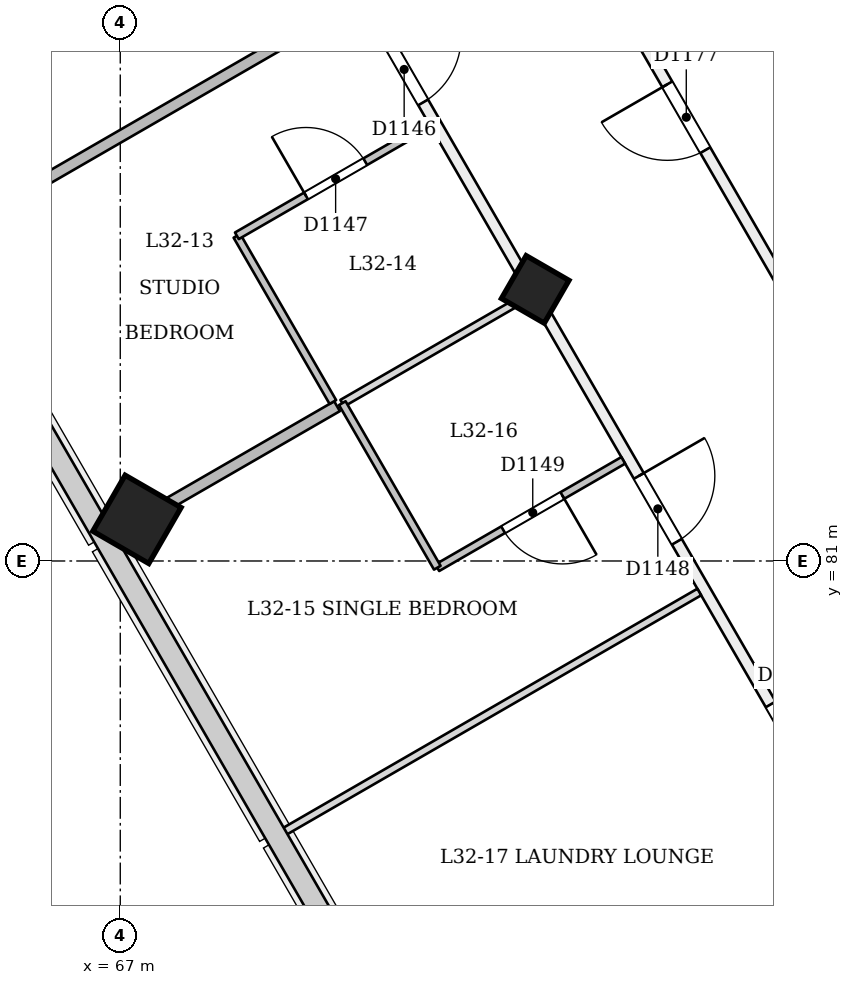
"""IFC4 building model, lengths in metres.
Left out: names, types, materials, properties, quantities, classifications, styles, units other than length and angle.
Written with IfcOpenShell. Run it as: python <this file> out.ifc"""

import sys

from ifc_helpers import new_model, si_unit, direction, frame, frame_2d, origin, origin_2d, place, context, subcontext, project, spatial, rectangle, extrude, element, fill, save


model = new_model("IFC4")
c1 = context("Model", 3, precision=1e-05, world=origin(), true_north=direction((0.0, 1.0)))
c2 = subcontext(c1, "Body", "Model", "MODEL_VIEW")
j1 = project(units=[si_unit("LENGTHUNIT", "METRE"), si_unit("PLANEANGLEUNIT", "RADIAN")], contexts=[c1])
p1 = place(None, origin())
s1 = spatial("IfcSite", under=j1, at=p1, CompositionType="ELEMENT")
p2 = place(p1, origin())
s2 = spatial("IfcBuilding", under=s1, at=p2, CompositionType="ELEMENT")
p3 = place(p2, frame((0.0, 0.0, 127.8)))
s3 = spatial("IfcBuildingStorey", under=s2, at=p3, CompositionType="ELEMENT", Elevation=127.8)
p4 = place(p3, frame((72.432, 84.526, -0.02), z_axis=(0.02222134892, 0.038480872521, 0.999012229206), x_axis=(-0.865639418776, -0.499186807044, 0.038482831667)))
e1 = element("IfcColumn", 1, at=p4, inside=s3, PredefinedType="COLUMN", context=c2, shape_type="SweptSolid", body=[
    extrude(rectangle(XDim=0.65, YDim=0.65, at=origin_2d()), origin(), (0.0, 0.0, 1.0), 3.604),
])
p5 = place(p3, frame((67.192, 81.5, -0.026), z_axis=(0.02215369191, 0.038413282303, 0.999016333038), x_axis=(-0.865362005459, -0.499673714439, 0.038402846323)))
e2 = element("IfcColumn", 2, at=p5, inside=s3, PredefinedType="COLUMN", context=c2, shape_type="SweptSolid", body=[
    extrude(rectangle(XDim=0.85, YDim=0.85, at=origin_2d()), origin(), (0.0, 0.0, 1.0), 3.604),
])
p6 = place(p3, frame((85.0, 68.559, 0.0), z_axis=(0.0, 0.0, 1.0), x_axis=(-0.499999561005, 0.866025657238, 0.0)))
e3 = element("IfcWall", 3, at=p6, inside=s3, PredefinedType="PARTITIONING", context=c2, shape_type="SweptSolid", body=[
    extrude(rectangle(XDim=24.989, YDim=0.15, at=frame_2d((12.495, 0.0))), origin(), (0.0, 0.0, 1.0), 3.15),
])
p7 = place(p6, frame((2.515, 0.0, 0.0)))
e4 = element("IfcOpeningElement", 4, at=p7, cuts=e3, PredefinedType="OPENING", context=c2, shape_type="SweptSolid", body=[
    extrude(rectangle(XDim=0.9, YDim=2.1, at=frame_2d((0.45, 1.05))), frame((0.0, 0.085, 0.0), z_axis=(0.0, -1.0, 0.0), x_axis=(1.0, 0.0, 0.0)), (0.0, 0.0, 1.0), 0.171),
])
p8 = place(p6, frame((15.573, 0.0, 0.0)))
e5 = element("IfcOpeningElement", 5, at=p8, cuts=e3, PredefinedType="OPENING", context=c2, shape_type="SweptSolid", body=[
    extrude(rectangle(XDim=1.0, YDim=2.1, at=frame_2d((0.5, 1.05))), frame((0.0, 0.085, 0.0), z_axis=(0.0, -1.0, 0.0), x_axis=(1.0, 0.0, 0.0)), (0.0, 0.0, 1.0), 0.171),
])
p9 = place(p6, frame((7.186, 0.0, 0.0)))
e6 = element("IfcOpeningElement", 6, at=p9, cuts=e3, PredefinedType="OPENING", context=c2, shape_type="SweptSolid", body=[
    extrude(rectangle(XDim=1.0, YDim=2.1, at=frame_2d((0.5, 1.05))), frame((0.0, 0.085, 0.0), z_axis=(0.0, -1.0, 0.0), x_axis=(1.0, 0.0, 0.0)), (0.0, 0.0, 1.0), 0.171),
])
p10 = place(p6, frame((11.179, 0.0, 0.0)))
e7 = element("IfcOpeningElement", 7, at=p10, cuts=e3, PredefinedType="OPENING", context=c2, shape_type="SweptSolid", body=[
    extrude(rectangle(XDim=1.0, YDim=2.1, at=frame_2d((0.5, 1.05))), frame((0.0, 0.085, 0.0), z_axis=(0.0, -1.0, 0.0), x_axis=(1.0, 0.0, 0.0)), (0.0, 0.0, 1.0), 0.171),
])
p11 = place(p6, frame((20.607, 0.0, 0.0)))
e8 = element("IfcOpeningElement", 8, at=p11, cuts=e3, PredefinedType="OPENING", context=c2, shape_type="SweptSolid", body=[
    extrude(rectangle(XDim=1.0, YDim=2.1, at=frame_2d((0.5, 1.05))), frame((0.0, 0.085, 0.0), z_axis=(0.0, -1.0, 0.0), x_axis=(1.0, 0.0, 0.0)), (0.0, 0.0, 1.0), 0.171),
])
p12 = place(p3, frame((64.534, 98.206, 0.0), z_axis=(0.0, 0.0, 1.0), x_axis=(0.499999603446, -0.866025632735, 0.0)))
e9 = element("IfcWall", 9, at=p12, inside=s3, PredefinedType="PARTITIONING", context=c2, shape_type="SweptSolid", body=[
    extrude(rectangle(XDim=40.592, YDim=0.15, at=frame_2d((20.296, 0.0))), origin(), (0.0, 0.0, 1.0), 2.75),
])
p13 = place(p12, frame((0.2, 0.0, 0.0)))
e10 = element("IfcOpeningElement", 10, at=p13, cuts=e9, PredefinedType="OPENING", context=c2, shape_type="SweptSolid", body=[
    extrude(rectangle(XDim=1.2, YDim=2.1, at=frame_2d((0.6, 1.05))), frame((0.0, 0.085, 0.0), z_axis=(0.0, -1.0, 0.0), x_axis=(1.0, 0.0, 0.0)), (0.0, 0.0, 1.0), 0.171),
])
p14 = place(p12, frame((3.016, 0.0, 0.0)))
e11 = element("IfcOpeningElement", 11, at=p14, cuts=e9, PredefinedType="OPENING", context=c2, shape_type="SweptSolid", body=[
    extrude(rectangle(XDim=1.0, YDim=2.1, at=frame_2d((0.5, 1.05))), frame((0.0, 0.085, 0.0), z_axis=(0.0, -1.0, 0.0), x_axis=(1.0, 0.0, 0.0)), (0.0, 0.0, 1.0), 0.171),
])
p15 = place(p12, frame((9.691, 0.0, 0.0)))
e12 = element("IfcOpeningElement", 12, at=p15, cuts=e9, PredefinedType="OPENING", context=c2, shape_type="SweptSolid", body=[
    extrude(rectangle(XDim=1.0, YDim=2.1, at=frame_2d((0.5, 1.05))), frame((0.0, 0.085, 0.0), z_axis=(0.0, -1.0, 0.0), x_axis=(1.0, 0.0, 0.0)), (0.0, 0.0, 1.0), 0.171),
])
p16 = place(p12, frame((11.901, 0.0, 0.0)))
e13 = element("IfcOpeningElement", 13, at=p16, cuts=e9, PredefinedType="OPENING", context=c2, shape_type="SweptSolid", body=[
    extrude(rectangle(XDim=1.0, YDim=2.1, at=frame_2d((0.5, 1.05))), frame((0.0, 0.085, 0.0), z_axis=(0.0, -1.0, 0.0), x_axis=(1.0, 0.0, 0.0)), (0.0, 0.0, 1.0), 0.171),
])
p17 = place(p12, frame((18.576, 0.0, 0.0)))
e14 = element("IfcOpeningElement", 14, at=p17, cuts=e9, PredefinedType="OPENING", context=c2, shape_type="SweptSolid", body=[
    extrude(rectangle(XDim=1.0, YDim=2.1, at=frame_2d((0.5, 1.05))), frame((0.0, 0.085, 0.0), z_axis=(0.0, -1.0, 0.0), x_axis=(1.0, 0.0, 0.0)), (0.0, 0.0, 1.0), 0.171),
])
p18 = place(p12, frame((22.046, 0.0, 0.0)))
e15 = element("IfcOpeningElement", 15, at=p18, cuts=e9, PredefinedType="OPENING", context=c2, shape_type="SweptSolid", body=[
    extrude(rectangle(XDim=1.0, YDim=2.1, at=frame_2d((0.5, 1.05))), frame((0.0, 0.085, 0.0), z_axis=(0.0, -1.0, 0.0), x_axis=(1.0, 0.0, 0.0)), (0.0, 0.0, 1.0), 0.171),
])
p19 = place(p12, frame((27.576, 0.0, 0.0)))
e16 = element("IfcOpeningElement", 16, at=p19, cuts=e9, PredefinedType="OPENING", context=c2, shape_type="SweptSolid", body=[
    extrude(rectangle(XDim=1.0, YDim=2.1, at=frame_2d((0.5, 1.05))), frame((0.0, 0.085, 0.0), z_axis=(0.0, -1.0, 0.0), x_axis=(1.0, 0.0, 0.0)), (0.0, 0.0, 1.0), 0.171),
])
p20 = place(p12, frame((31.046, 0.0, 0.0)))
e17 = element("IfcOpeningElement", 17, at=p20, cuts=e9, PredefinedType="OPENING", context=c2, shape_type="SweptSolid", body=[
    extrude(rectangle(XDim=1.0, YDim=2.1, at=frame_2d((0.5, 1.05))), frame((0.0, 0.085, 0.0), z_axis=(0.0, -1.0, 0.0), x_axis=(1.0, 0.0, 0.0)), (0.0, 0.0, 1.0), 0.171),
])
p21 = place(p12, frame((36.576, 0.0, 0.0)))
e18 = element("IfcOpeningElement", 18, at=p21, cuts=e9, PredefinedType="OPENING", context=c2, shape_type="SweptSolid", body=[
    extrude(rectangle(XDim=1.0, YDim=2.1, at=frame_2d((0.5, 1.05))), frame((0.0, 0.085, 0.0), z_axis=(0.0, -1.0, 0.0), x_axis=(1.0, 0.0, 0.0)), (0.0, 0.0, 1.0), 0.171),
])
p22 = place(p12, frame((39.323, 0.0, 0.0)))
e19 = element("IfcOpeningElement", 19, at=p22, cuts=e9, PredefinedType="OPENING", context=c2, shape_type="SweptSolid", body=[
    extrude(rectangle(XDim=1.0, YDim=2.1, at=frame_2d((0.5, 1.05))), frame((0.0, 0.085, 0.0), z_axis=(0.0, -1.0, 0.0), x_axis=(1.0, 0.0, 0.0)), (0.0, 0.0, 1.0), 0.171),
])
p23 = place(p3, frame((64.622, 85.213, 0.0), z_axis=(0.0, 0.0, 1.0), x_axis=(0.866025401434, 0.500000004071, 0.0)))
e20 = element("IfcWall", 20, at=p23, inside=s3, PredefinedType="PARTITIONING", context=c2, shape_type="SweptSolid", body=[
    extrude(rectangle(XDim=6.345, YDim=0.15, at=frame_2d((3.173, 0.0))), origin(), (0.0, 0.0, 1.0), 2.65),
])
p24 = place(p3, frame((69.797, 83.091, 0.0), z_axis=(0.0, 0.0, 1.0), x_axis=(-0.500048846702, 0.865997200291, 0.0)))
e21 = element("IfcWall", 21, at=p24, inside=s3, PredefinedType="PARTITIONING", context=c2, shape_type="SweptSolid", body=[
    extrude(rectangle(XDim=2.525, YDim=0.1, at=frame_2d((1.263, 0.0))), origin(), (0.0, 0.0, 1.0), 2.75),
])
p25 = place(p3, frame((68.534, 85.278, 0.0), z_axis=(0.0, 0.0, 1.0), x_axis=(0.866046596414, 0.499963291492, 0.0)))
e22 = element("IfcWall", 22, at=p25, inside=s3, PredefinedType="PARTITIONING", context=c2, shape_type="SweptSolid", body=[
    extrude(rectangle(XDim=2.925, YDim=0.1, at=frame_2d((1.462, 0.0))), origin(), (0.0, 0.0, 1.0), 3.15),
])
p26 = place(p25, frame((1.05, 0.0, 0.0)))
e23 = element("IfcOpeningElement", 23, at=p26, cuts=e22, PredefinedType="OPENING", context=c2, shape_type="SweptSolid", body=[
    extrude(rectangle(XDim=0.9, YDim=2.1, at=frame_2d((0.45, 1.05))), frame((0.0, 0.061, 0.0), z_axis=(0.0, -1.0, 0.0), x_axis=(1.0, 0.0, 0.0)), (0.0, 0.0, 1.0), 0.121),
])
p27 = place(p3, frame((66.89, 81.326, 0.0), z_axis=(0.0, 0.0, 1.0), x_axis=(0.866020337685, 0.500008774639, 0.0)))
e24 = element("IfcWall", 24, at=p27, inside=s3, PredefinedType="PARTITIONING", context=c2, shape_type="SweptSolid", body=[
    extrude(rectangle(XDim=3.42, YDim=0.15, at=frame_2d((1.71, 0.0))), origin(), (0.0, 0.0, 1.0), 2.65),
])
p28 = place(p3, frame((69.921, 83.076, 0.0), z_axis=(0.0, 0.0, 1.0), x_axis=(0.866011447264, 0.500024172624, 0.0)))
e25 = element("IfcWall", 25, at=p28, inside=s3, PredefinedType="PARTITIONING", context=c2, shape_type="SweptSolid", body=[
    extrude(rectangle(XDim=2.825, YDim=0.1, at=frame_2d((1.413, 0.0))), origin(), (0.0, 0.0, 1.0), 2.75),
])
p29 = place(p3, frame((73.617, 82.324, 0.0), z_axis=(0.0, 0.0, 1.0), x_axis=(-0.866048868473, -0.499959355765, 0.0)))
e26 = element("IfcWall", 26, at=p29, inside=s3, PredefinedType="PARTITIONING", context=c2, shape_type="SweptSolid", body=[
    extrude(rectangle(XDim=2.825, YDim=0.1, at=frame_2d((1.413, 0.0))), origin(), (0.0, 0.0, 1.0), 3.15),
])
p30 = place(p29, frame((0.925, 0.0, 0.0)))
e27 = element("IfcOpeningElement", 27, at=p30, cuts=e26, PredefinedType="OPENING", context=c2, shape_type="SweptSolid", body=[
    extrude(rectangle(XDim=0.9, YDim=2.1, at=frame_2d((0.45, 1.05))), frame((0.0, 0.061, 0.0), z_axis=(0.0, -1.0, 0.0), x_axis=(1.0, 0.0, 0.0)), (0.0, 0.0, 1.0), 0.121),
])
p31 = place(p3, frame((71.171, 80.911, 0.0), z_axis=(0.0, 0.0, 1.0), x_axis=(-0.500004234368, 0.866022959057, 0.0)))
e28 = element("IfcWall", 28, at=p31, inside=s3, PredefinedType="PARTITIONING", context=c2, shape_type="SweptSolid", body=[
    extrude(rectangle(XDim=2.5, YDim=0.1, at=frame_2d((1.25, 0.0))), origin(), (0.0, 0.0, 1.0), 2.75),
])
p32 = place(p3, frame((69.122, 77.419, 0.0), z_axis=(0.0, 0.0, 1.0), x_axis=(0.866025401434, 0.500000004071, 0.0)))
e29 = element("IfcWall", 29, at=p32, inside=s3, PredefinedType="PARTITIONING", context=c2, shape_type="SweptSolid", body=[
    extrude(rectangle(XDim=6.345, YDim=0.1, at=frame_2d((3.173, 0.0))), origin(), (0.0, 0.0, 1.0), 2.65),
])
p33 = place(p3, frame((71.39, 73.532, 0.0), z_axis=(0.0, 0.0, 1.0), x_axis=(0.866032601554, 0.49998753289, 0.0)))
e30 = element("IfcWall", 30, at=p33, inside=s3, PredefinedType="PARTITIONING", context=c2, shape_type="SweptSolid", body=[
    extrude(rectangle(XDim=6.325, YDim=0.1, at=frame_2d((3.163, 0.0))), origin(), (0.0, 0.0, 1.0), 2.65),
])
p34 = place(p16, origin())
e31 = element("IfcDoor", 31, at=p34, inside=s3, OperationType="SINGLE_SWING_LEFT", PredefinedType="NOTDEFINED", context=c2, shape_type="SweptSolid", body=[
    extrude(rectangle(XDim=1.0, YDim=2.1, at=frame_2d((0.5, 1.05))), frame((0.0, 0.025, 0.0), z_axis=(0.0, -1.0, 0.0), x_axis=(1.0, 0.0, 0.0)), (0.0, 0.0, 1.0), 0.05),
])
fill(e13, e31)
p35 = place(p26, origin())
e32 = element("IfcDoor", 32, at=p35, inside=s3, OperationType="SINGLE_SWING_LEFT", PredefinedType="NOTDEFINED", context=c2, shape_type="SweptSolid", body=[
    extrude(rectangle(XDim=0.9, YDim=2.1, at=frame_2d((0.45, 1.05))), frame((0.0, 0.025, 0.0), z_axis=(0.0, -1.0, 0.0), x_axis=(1.0, 0.0, 0.0)), (0.0, 0.0, 1.0), 0.05),
])
fill(e23, e32)
p36 = place(p17, origin())
e33 = element("IfcDoor", 33, at=p36, inside=s3, OperationType="SINGLE_SWING_LEFT", PredefinedType="NOTDEFINED", context=c2, shape_type="SweptSolid", body=[
    extrude(rectangle(XDim=1.0, YDim=2.1, at=frame_2d((0.5, 1.05))), frame((0.0, 0.025, 0.0), z_axis=(0.0, -1.0, 0.0), x_axis=(1.0, 0.0, 0.0)), (0.0, 0.0, 1.0), 0.05),
])
fill(e14, e33)
p37 = place(p30, origin())
e34 = element("IfcDoor", 34, at=p37, inside=s3, OperationType="SINGLE_SWING_LEFT", PredefinedType="NOTDEFINED", context=c2, shape_type="SweptSolid", body=[
    extrude(rectangle(XDim=0.9, YDim=2.1, at=frame_2d((0.45, 1.05))), frame((0.0, 0.025, 0.0), z_axis=(0.0, -1.0, 0.0), x_axis=(1.0, 0.0, 0.0)), (0.0, 0.0, 1.0), 0.05),
])
fill(e27, e34)
p38 = place(p18, origin())
e35 = element("IfcDoor", 35, at=p38, inside=s3, OperationType="SINGLE_SWING_RIGHT", PredefinedType="NOTDEFINED", context=c2, shape_type="SweptSolid", body=[
    extrude(rectangle(XDim=1.0, YDim=2.1, at=frame_2d((0.5, 1.05))), frame((0.0, 0.025, 0.0), z_axis=(0.0, -1.0, 0.0), x_axis=(1.0, 0.0, 0.0)), (0.0, 0.0, 1.0), 0.05),
])
fill(e15, e35)
p39 = place(p11, origin())
e36 = element("IfcDoor", 36, at=p39, inside=s3, OperationType="SINGLE_SWING_RIGHT", PredefinedType="NOTDEFINED", context=c2, shape_type="SweptSolid", body=[
    extrude(rectangle(XDim=1.0, YDim=2.1, at=frame_2d((0.5, 1.05))), frame((0.0, 0.025, 0.0), z_axis=(0.0, -1.0, 0.0), x_axis=(1.0, 0.0, 0.0)), (0.0, 0.0, 1.0), 0.05),
])
fill(e8, e36)
save(model, sys.argv[1])
